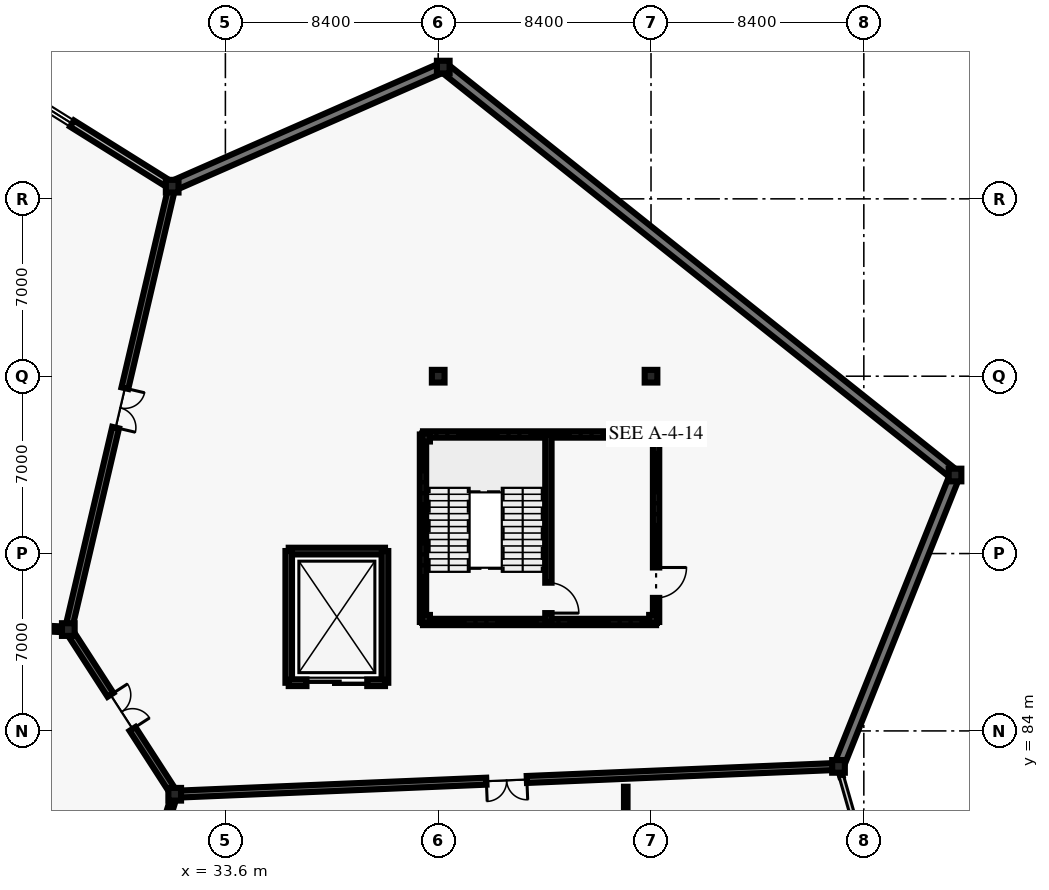
"""IFC4 building model, lengths in metres.
Left out: names, types, materials, properties, quantities, classifications, styles, units other than length and angle.
Written with IfcOpenShell. Run it as: python <this file> out.ifc"""

import sys

from ifc_helpers import new_model, si_unit, direction, frame, frame_2d, origin, origin_2d, place, context, subcontext, project, spatial, rectangle, i_section, extrude, element, fill, save


model = new_model("IFC4")
c1 = context("Model", 3, precision=1e-05, world=origin(), true_north=direction((0.0, 1.0)))
c2 = subcontext(c1, "Body", "Model", "MODEL_VIEW")
j1 = project(units=[si_unit("LENGTHUNIT", "METRE"), si_unit("PLANEANGLEUNIT", "RADIAN")], contexts=[c1])
p1 = place(None, origin())
s1 = spatial("IfcSite", under=j1, at=p1, CompositionType="ELEMENT")
p2 = place(p1, origin())
s2 = spatial("IfcBuilding", under=s1, at=p2, CompositionType="ELEMENT")
p3 = place(p2, frame((0.0, 0.0, 5.4)))
s3 = spatial("IfcBuildingStorey", under=s2, at=p3, CompositionType="ELEMENT", Elevation=5.4)
for number, where, z_axis, x_axis in (
    (1, (27.4, 88.0, 0.0), (0.0, 0.0, 1.0), (1.0, 0.0, 0.0)),
    (2, (31.5, 105.5, 0.0), (0.0, 0.0, 1.0), (1.0, 0.0, 0.0)),
    (3, (31.6, 81.5, 0.0), (0.0, 0.0, 1.0), (1.0, 0.0, 0.0)),
    (4, (42.2, 110.2, 0.0), (0.0, 0.0, 1.0), (1.0, 0.0, 0.0)),
    (5, (57.8, 82.6, 0.0), (0.0, 0.0, 1.0), (1.0, 0.0, 0.0)),
    (6, (62.4, 94.1, 0.0), (0.0, 0.0, 1.0), (1.0, 0.0, 0.0)),
    (7, (42.0, 98.0, 0.0), (0.0, 0.0, 1.0), (1.0, 0.0, 0.0)),
    (8, (50.4, 98.0, 0.0), (0.0, 0.0, 1.0), (1.0, 0.0, 0.0)),
):
    element("IfcColumn", number, at=place(p3, frame(where, z_axis=z_axis, x_axis=x_axis)), inside=s3, PredefinedType="COLUMN", context=c2, shape_type="SweptSolid", body=[
        extrude(rectangle(XDim=0.5, YDim=0.5, at=origin_2d()), origin(), (0.0, 0.0, 1.0), 4.8),
    ])
for number, where, z_axis, x_axis in (
    (9, (41.52, 88.42, 0.0), (0.0, 0.0, 1.0), (1.0, 0.0, 0.0)),
    (10, (50.48, 88.42, 0.0), (0.0, 0.0, 1.0), (1.0, 0.0, 0.0)),
    (11, (50.48, 95.58, 0.0), (0.0, 0.0, 1.0), (1.0, 0.0, 0.0)),
    (12, (41.52, 95.58, 0.0), (0.0, 0.0, 1.0), (1.0, 0.0, 0.0)),
):
    element("IfcColumn", number, at=place(p3, frame(where, z_axis=z_axis, x_axis=x_axis)), inside=s3, PredefinedType="COLUMN", context=c2, shape_type="SweptSolid", body=[
        extrude(i_section(OverallWidth=0.307, OverallDepth=0.315, WebThickness=0.012, FlangeThickness=0.019, FilletRadius=0.017, at=origin_2d()), origin(), (0.0, 0.0, 1.0), 4.8),
    ])
p4 = place(p3, frame((57.829, 82.502, 0.0), z_axis=(0.0, 0.0, 1.0), x_axis=(0.275977786159, -0.961164013864, 0.0)))
e13 = element("IfcWall", 13, at=p4, inside=s3, PredefinedType="SOLIDWALL", context=c2, shape_type="SweptSolid", body=[
    extrude(rectangle(XDim=0.308, YDim=0.095, at=frame_2d((0.154, 0.0))), origin(), (0.0, 0.0, 1.0), 3.62),
])
p5 = place(p3, frame((62.4, 94.1, 0.0), z_axis=(0.0, 0.0, 1.0), x_axis=(-0.371407751599, -0.928469860605, 0.0)))
e14 = element("IfcWall", 14, at=p5, inside=s3, PredefinedType="SOLIDWALL", context=c2, shape_type="SweptSolid", body=[
    extrude(rectangle(XDim=12.326, YDim=0.4, at=frame_2d((6.163, 0.0))), origin(), (0.0, 0.0, 1.0), 3.62),
])
p6 = place(p3, frame((42.2, 110.2, 0.0), z_axis=(0.0, 0.0, 1.0), x_axis=(0.78200261515, -0.623275147827, 0.0)))
e15 = element("IfcWall", 15, at=p6, inside=s3, PredefinedType="SOLIDWALL", context=c2, shape_type="SweptSolid", body=[
    extrude(rectangle(XDim=25.831, YDim=0.4, at=frame_2d((12.916, 0.0))), origin(), (0.0, 0.0, 1.0), 3.62),
])
p7 = place(p3, frame((31.555, 105.524, 0.0), z_axis=(0.0, 0.0, 1.0), x_axis=(0.915561631163, 0.402177696474, 0.0)))
e16 = element("IfcWall", 16, at=p7, inside=s3, PredefinedType="SOLIDWALL", context=c2, shape_type="SweptSolid", body=[
    extrude(rectangle(XDim=11.627, YDim=0.4, at=frame_2d((5.813, 0.0))), origin(), (0.0, 0.0, 1.0), 3.62),
])
p8 = place(p3, frame((21.1, 112.0, 0.0), z_axis=(0.0, 0.0, 1.0), x_axis=(0.84799942789, -0.529997141784, 0.0)))
e17 = element("IfcWall", 17, at=p8, inside=s3, PredefinedType="SOLIDWALL", context=c2, shape_type="SweptSolid", body=[
    extrude(rectangle(XDim=12.204, YDim=0.29, at=frame_2d((6.102, 0.0))), origin(), (0.0, 0.0, 1.0), 3.62),
])
p9 = place(p8, frame((4.602, 0.0, 0.95)))
e18 = element("IfcOpeningElement", 18, at=p9, cuts=e17, PredefinedType="OPENING", context=c2, shape_type="SweptSolid", body=[
    extrude(rectangle(XDim=3.0, YDim=2.1, at=frame_2d((1.5, 1.05))), frame((0.0, 0.155, 0.0), z_axis=(0.0, -1.0, 0.0), x_axis=(1.0, 0.0, 0.0)), (0.0, 0.0, 1.0), 0.31),
])
p10 = place(p3, frame((57.8, 82.6, 0.0), z_axis=(0.0, 0.0, 1.0), x_axis=(-0.999119645224, -0.041951573605, 0.0)))
e19 = element("IfcWall", 19, at=p10, inside=s3, PredefinedType="SOLIDWALL", context=c2, shape_type="SweptSolid", body=[
    extrude(rectangle(XDim=26.223, YDim=0.275, at=frame_2d((13.112, 0.0))), origin(), (0.0, 0.0, 1.0), 4.02),
])
p11 = place(p10, frame((12.312, 0.0, 0.0)))
e20 = element("IfcOpeningElement", 20, at=p11, cuts=e19, PredefinedType="OPENING", context=c2, shape_type="SweptSolid", body=[
    extrude(rectangle(XDim=1.6, YDim=2.45, at=frame_2d((0.8, 1.225))), frame((0.0, 0.147, 0.0), z_axis=(0.0, -1.0, 0.0), x_axis=(1.0, 0.0, 0.0)), (0.0, 0.0, 1.0), 0.295),
])
p12 = place(p3, frame((31.6, 81.5, 0.0), z_axis=(0.0, 0.0, 1.0), x_axis=(-0.294479498062, -0.955657797133, 0.0)))
e21 = element("IfcWall", 21, at=p12, inside=s3, PredefinedType="SOLIDWALL", context=c2, shape_type="SweptSolid", body=[
    extrude(rectangle(XDim=17.998, YDim=0.225, at=frame_2d((8.999, 0.0))), origin(), (0.0, 0.0, 1.0), 4.02),
])
p13 = place(p12, frame((7.999, 0.0, 0.0)))
e22 = element("IfcOpeningElement", 22, at=p13, cuts=e21, PredefinedType="OPENING", context=c2, shape_type="SweptSolid", body=[
    extrude(rectangle(XDim=2.0, YDim=2.5, at=frame_2d((1.0, 1.25))), frame((0.0, 0.123, 0.0), z_axis=(0.0, -1.0, 0.0), x_axis=(1.0, 0.0, 0.0)), (0.0, 0.0, 1.0), 0.245),
])
p14 = place(p3, frame((27.4, 88.0, 0.0), z_axis=(0.0, 0.0, 1.0), x_axis=(0.542733189748, -0.839905164138, 0.0)))
e23 = element("IfcWall", 23, at=p14, inside=s3, PredefinedType="SOLIDWALL", context=c2, shape_type="SweptSolid", body=[
    extrude(rectangle(XDim=7.739, YDim=0.275, at=frame_2d((3.87, 0.0))), origin(), (0.0, 0.0, 1.0), 4.02),
])
p15 = place(p14, frame((3.069, 0.0, 0.0)))
e24 = element("IfcOpeningElement", 24, at=p15, cuts=e23, PredefinedType="OPENING", context=c2, shape_type="SweptSolid", body=[
    extrude(rectangle(XDim=1.6, YDim=2.45, at=frame_2d((0.8, 1.225))), frame((0.0, 0.147, 0.0), z_axis=(0.0, -1.0, 0.0), x_axis=(1.0, 0.0, 0.0)), (0.0, 0.0, 1.0), 0.295),
])
p16 = place(p3, frame((31.5, 105.5, 0.0), z_axis=(0.0, 0.0, 1.0), x_axis=(-0.228114067381, -0.973634414071, 0.0)))
e25 = element("IfcWall", 25, at=p16, inside=s3, PredefinedType="SOLIDWALL", context=c2, shape_type="SweptSolid", body=[
    extrude(rectangle(XDim=17.974, YDim=0.275, at=frame_2d((8.987, 0.0))), origin(), (0.0, 0.0, 1.0), 4.02),
])
p17 = place(p16, frame((8.187, 0.0, 0.0)))
e26 = element("IfcOpeningElement", 26, at=p17, cuts=e25, PredefinedType="OPENING", context=c2, shape_type="SweptSolid", body=[
    extrude(rectangle(XDim=1.6, YDim=2.45, at=frame_2d((0.8, 1.225))), frame((0.0, 0.147, 0.0), z_axis=(0.0, -1.0, 0.0), x_axis=(1.0, 0.0, 0.0)), (0.0, 0.0, 1.0), 0.295),
])
p18 = place(p3, frame((27.4, 88.0, 0.0), z_axis=(0.0, 0.0, 1.0), x_axis=(-0.998939864331, 0.046034198714, 0.0)))
e27 = element("IfcWall", 27, at=p18, inside=s3, PredefinedType="SOLIDWALL", context=c2, shape_type="SweptSolid", body=[
    extrude(rectangle(XDim=21.723, YDim=0.225, at=frame_2d((10.861, 0.0))), origin(), (0.0, 0.0, 1.0), 4.02),
])
p19 = place(p18, frame((9.862, 0.0, 0.0)))
e28 = element("IfcOpeningElement", 28, at=p19, cuts=e27, PredefinedType="OPENING", context=c2, shape_type="SweptSolid", body=[
    extrude(rectangle(XDim=2.0, YDim=2.5, at=frame_2d((1.0, 1.25))), frame((0.0, 0.123, 0.0), z_axis=(0.0, -1.0, 0.0), x_axis=(1.0, 0.0, 0.0)), (0.0, 0.0, 1.0), 0.245),
])
p20 = place(p3, frame((49.403, 57.267, 0.0), z_axis=(0.0, 0.0, 1.0), x_axis=(0.0, 1.0, 0.0)))
e29 = element("IfcWall", 29, at=p20, inside=s3, PredefinedType="PARTITIONING", context=c2, shape_type="SweptSolid", body=[
    extrude(rectangle(XDim=24.53, YDim=0.14, at=frame_2d((12.265, 0.0))), origin(), (0.0, 0.0, 1.0), 3.32),
])
p21 = place(p20, frame((11.805, 0.0, 0.0)))
e30 = element("IfcOpeningElement", 30, at=p21, cuts=e29, PredefinedType="OPENING", context=c2, shape_type="SweptSolid", body=[
    extrude(rectangle(XDim=0.92, YDim=2.1, at=frame_2d((0.46, 1.05))), frame((0.0, 0.08, 0.0), z_axis=(0.0, -1.0, 0.0), x_axis=(1.0, 0.0, 0.0)), (0.0, 0.0, 1.0), 0.16),
])
p22 = place(p3, frame((41.4, 88.3, 0.0), z_axis=(0.0, 0.0, 1.0), x_axis=(0.0, 1.0, 0.0)))
e31 = element("IfcWall", 31, at=p22, inside=s3, PredefinedType="SHEAR", context=c2, shape_type="SweptSolid", body=[
    extrude(rectangle(XDim=7.4, YDim=0.25, at=frame_2d((3.7, 0.0))), origin(), (0.0, 0.0, 1.0), 4.56),
])
for number, where, z_axis, x_axis in (
    (32, (41.4, 95.7, 0.0), (0.0, 0.0, 1.0), (1.0, 0.0, 0.0)),
    (33, (50.6, 88.3, 0.0), (0.0, 0.0, 1.0), (-1.0, 0.0, 0.0)),
):
    element("IfcWall", number, at=place(p3, frame(where, z_axis=z_axis, x_axis=x_axis)), inside=s3, PredefinedType="SHEAR", context=c2, shape_type="SweptSolid", body=[
        extrude(rectangle(XDim=9.2, YDim=0.25, at=frame_2d((4.6, 0.0))), origin(), (0.0, 0.0, 1.0), 4.56),
    ])
p23 = place(p3, frame((50.6, 95.7, 0.0), z_axis=(0.0, 0.0, 1.0), x_axis=(0.0, -1.0, 0.0)))
e34 = element("IfcWall", 34, at=p23, inside=s3, PredefinedType="SHEAR", context=c2, shape_type="SweptSolid", body=[
    extrude(rectangle(XDim=7.4, YDim=0.25, at=frame_2d((3.7, 0.0))), origin(), (0.0, 0.0, 1.0), 4.56),
])
p24 = place(p23, frame((5.25, 0.0, 0.0)))
e35 = element("IfcOpeningElement", 35, at=p24, cuts=e34, PredefinedType="OPENING", context=c2, shape_type="SweptSolid", body=[
    extrude(rectangle(XDim=1.2, YDim=2.2, at=frame_2d((0.6, 1.1))), frame((0.0, 0.135, 0.0), z_axis=(0.0, -1.0, 0.0), x_axis=(1.0, 0.0, 0.0)), (0.0, 0.0, 1.0), 0.27),
])
p25 = place(p3, frame((46.35, 95.7, 0.0), z_axis=(0.0, 0.0, 1.0), x_axis=(0.0, -1.0, 0.0)))
e36 = element("IfcWall", 36, at=p25, inside=s3, PredefinedType="SHEAR", context=c2, shape_type="SweptSolid", body=[
    extrude(rectangle(XDim=7.4, YDim=0.25, at=frame_2d((3.7, 0.0))), origin(), (0.0, 0.0, 1.0), 4.56),
])
p26 = place(p25, frame((5.85, 0.0, 0.0)))
e37 = element("IfcOpeningElement", 37, at=p26, cuts=e36, PredefinedType="OPENING", context=c2, shape_type="SweptSolid", body=[
    extrude(rectangle(XDim=1.2, YDim=2.2, at=frame_2d((0.6, 1.1))), frame((0.0, 0.135, 0.0), z_axis=(0.0, -1.0, 0.0), x_axis=(1.0, 0.0, 0.0)), (0.0, 0.0, 1.0), 0.27),
])
p27 = place(p3, frame((36.1, 91.1, 0.0), z_axis=(0.0, 0.0, 1.0), x_axis=(1.0, 0.0, 0.0)))
e38 = element("IfcWall", 38, at=p27, inside=s3, PredefinedType="SHEAR", context=c2, shape_type="SweptSolid", body=[
    extrude(rectangle(XDim=3.8, YDim=0.26, at=frame_2d((1.9, 0.0))), origin(), (0.0, 0.0, 1.0), 4.56),
])
for number, where, z_axis, x_axis in (
    (39, (39.9, 91.1, 0.0), (0.0, 0.0, 1.0), (0.0, -1.0, 0.0)),
    (40, (36.1, 85.9, 0.0), (0.0, 0.0, 1.0), (0.0, 1.0, 0.0)),
):
    element("IfcWall", number, at=place(p3, frame(where, z_axis=z_axis, x_axis=x_axis)), inside=s3, PredefinedType="SHEAR", context=c2, shape_type="SweptSolid", body=[
        extrude(rectangle(XDim=5.2, YDim=0.26, at=frame_2d((2.6, 0.0))), origin(), (0.0, 0.0, 1.0), 4.56),
    ])
p28 = place(p3, frame((39.9, 85.9, 0.0), z_axis=(0.0, 0.0, 1.0), x_axis=(-1.0, 0.0, 0.0)))
e41 = element("IfcWall", 41, at=p28, inside=s3, PredefinedType="SHEAR", context=c2, shape_type="SweptSolid", body=[
    extrude(rectangle(XDim=3.8, YDim=0.26, at=frame_2d((1.9, 0.0))), origin(), (0.0, 0.0, 1.0), 4.56),
])
p29 = place(p28, frame((0.7, 0.0, 0.0)))
e42 = element("IfcOpeningElement", 42, at=p29, cuts=e41, PredefinedType="OPENING", context=c2, shape_type="SweptSolid", body=[
    extrude(rectangle(XDim=2.4, YDim=2.85, at=frame_2d((1.2, 1.425))), frame((0.0, 0.14, 0.0), z_axis=(0.0, -1.0, 0.0), x_axis=(1.0, 0.0, 0.0)), (0.0, 0.0, 1.0), 0.28),
])
p30 = place(p9, origin())
e43 = element("IfcWindow", 43, at=p30, inside=s3, PartitioningType="SINGLE_PANEL", PredefinedType="WINDOW", context=c2, shape_type="SweptSolid", body=[
    extrude(rectangle(XDim=3.0, YDim=2.1, at=frame_2d((1.5, 1.05))), frame((0.0, 0.03, 0.0), z_axis=(0.0, -1.0, 0.0), x_axis=(1.0, 0.0, 0.0)), (0.0, 0.0, 1.0), 0.06),
])
fill(e18, e43)
p31 = place(p11, origin())
e44 = element("IfcDoor", 44, at=p31, inside=s3, OperationType="DOUBLE_DOOR_SINGLE_SWING", PredefinedType="DOOR", context=c2, shape_type="SweptSolid", body=[
    extrude(rectangle(XDim=1.6, YDim=2.45, at=frame_2d((0.8, 1.225))), frame((0.0, 0.025, 0.0), z_axis=(0.0, -1.0, 0.0), x_axis=(1.0, 0.0, 0.0)), (0.0, 0.0, 1.0), 0.05),
])
fill(e20, e44)
p32 = place(p15, origin())
e45 = element("IfcDoor", 45, at=p32, inside=s3, OperationType="DOUBLE_DOOR_SINGLE_SWING", PredefinedType="DOOR", context=c2, shape_type="SweptSolid", body=[
    extrude(rectangle(XDim=1.6, YDim=2.45, at=frame_2d((0.8, 1.225))), frame((0.0, 0.025, 0.0), z_axis=(0.0, -1.0, 0.0), x_axis=(1.0, 0.0, 0.0)), (0.0, 0.0, 1.0), 0.05),
])
fill(e24, e45)
p33 = place(p17, origin())
e46 = element("IfcDoor", 46, at=p33, inside=s3, OperationType="DOUBLE_DOOR_SINGLE_SWING", PredefinedType="DOOR", context=c2, shape_type="SweptSolid", body=[
    extrude(rectangle(XDim=1.6, YDim=2.45, at=frame_2d((0.8, 1.225))), frame((0.0, 0.025, 0.0), z_axis=(0.0, -1.0, 0.0), x_axis=(1.0, 0.0, 0.0)), (0.0, 0.0, 1.0), 0.05),
])
fill(e26, e46)
p34 = place(p24, origin())
e47 = element("IfcDoor", 47, at=p34, inside=s3, OperationType="SINGLE_SWING_LEFT", PredefinedType="DOOR", context=c2, shape_type="SweptSolid", body=[
    extrude(rectangle(XDim=1.2, YDim=2.2, at=frame_2d((0.6, 1.1))), frame((0.0, 0.025, 0.0), z_axis=(0.0, -1.0, 0.0), x_axis=(1.0, 0.0, 0.0)), (0.0, 0.0, 1.0), 0.05),
])
fill(e35, e47)
p35 = place(p26, origin())
e48 = element("IfcDoor", 48, at=p35, inside=s3, OperationType="SINGLE_SWING_RIGHT", PredefinedType="DOOR", context=c2, shape_type="SweptSolid", body=[
    extrude(rectangle(XDim=1.2, YDim=2.2, at=frame_2d((0.6, 1.1))), frame((0.0, 0.025, 0.0), z_axis=(0.0, -1.0, 0.0), x_axis=(1.0, 0.0, 0.0)), (0.0, 0.0, 1.0), 0.05),
])
fill(e37, e48)
p36 = place(p29, origin())
e49 = element("IfcDoor", 49, at=p36, inside=s3, OperationType="SLIDING_TO_LEFT", PredefinedType="DOOR", context=c2, shape_type="SweptSolid", body=[
    extrude(rectangle(XDim=2.4, YDim=2.85, at=frame_2d((1.2, 1.425))), frame((0.0, 0.025, 0.0), z_axis=(0.0, -1.0, 0.0), x_axis=(1.0, 0.0, 0.0)), (0.0, 0.0, 1.0), 0.05),
])
fill(e42, e49)
save(model, sys.argv[1])
